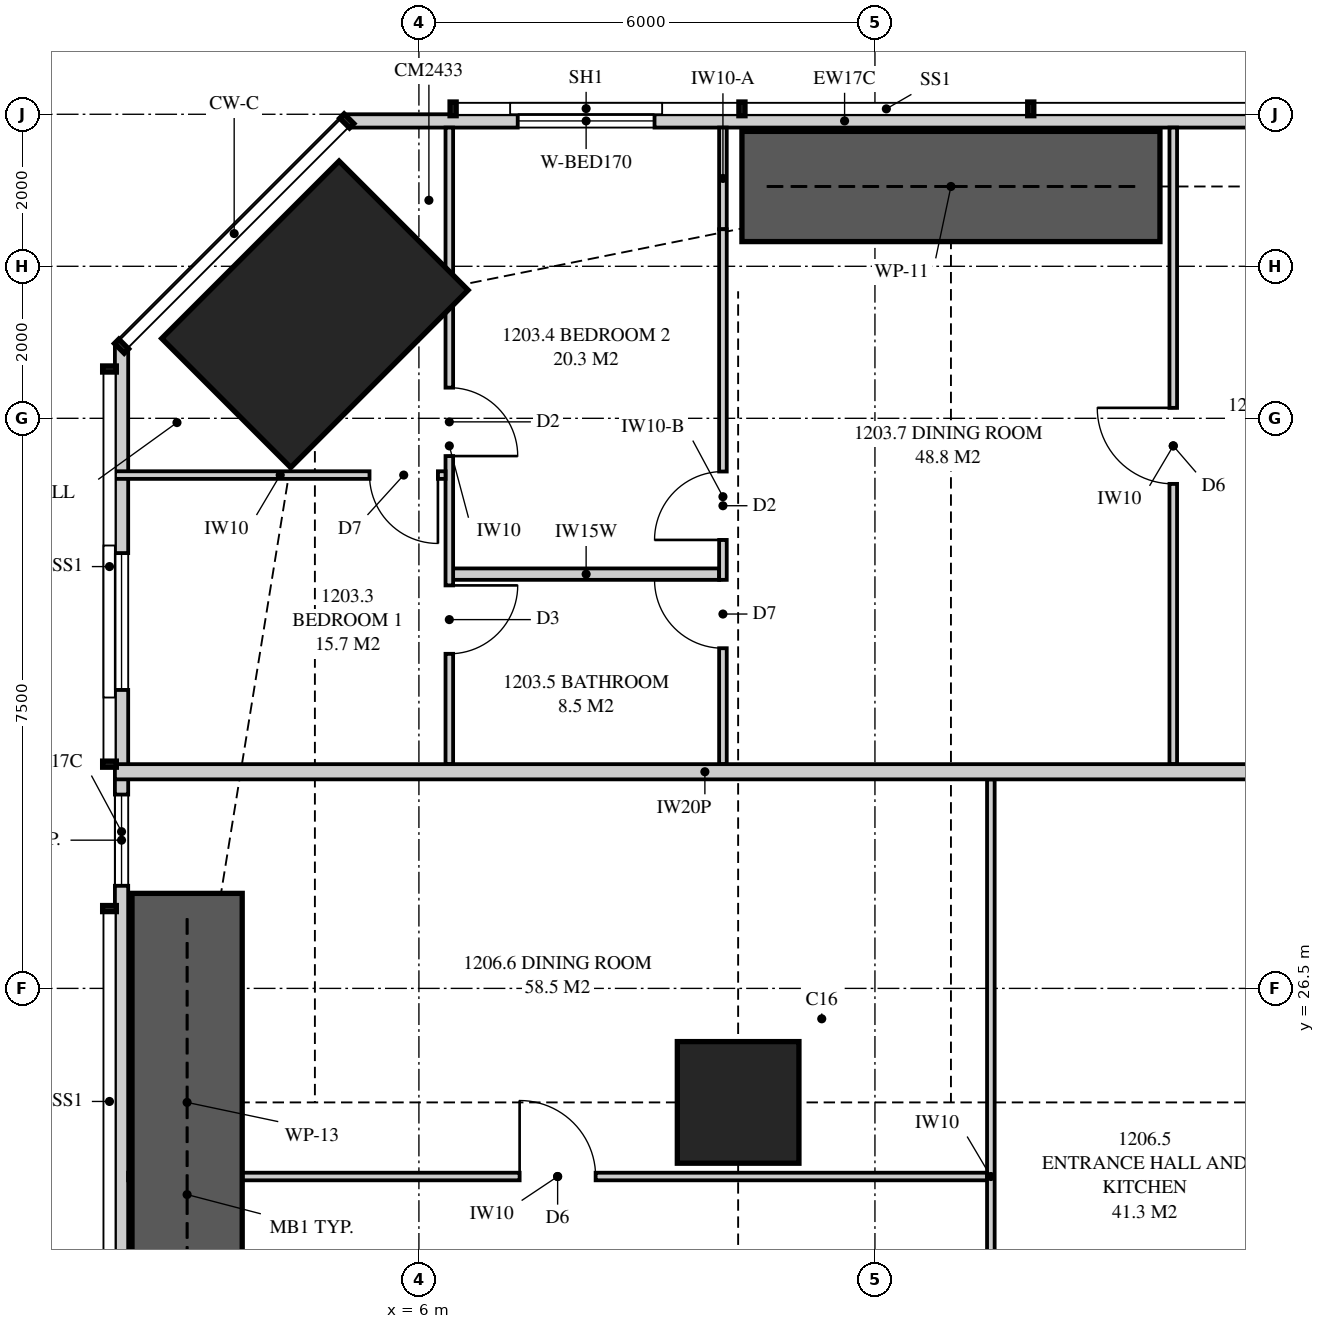
"""IFC4 building model, lengths in metres.
Left out: names, types, materials, properties, quantities, classifications, styles, units other than length and angle.
Written with IfcOpenShell. Run it as: python <this file> out.ifc"""

import sys

from ifc_helpers import new_model, si_unit, direction, frame, frame_2d, origin, origin_2d, place, context, subcontext, project, spatial, polyline, rectangle, outline, extrude, element, fill, save


model = new_model("IFC4")
c1 = context("Model", 3, precision=1e-05, world=origin(), true_north=direction((0.0, 1.0)))
c2 = subcontext(c1, "Body", "Model", "MODEL_VIEW")
j1 = project(units=[si_unit("LENGTHUNIT", "METRE"), si_unit("PLANEANGLEUNIT", "RADIAN")], contexts=[c1])
p1 = place(None, origin())
s1 = spatial("IfcSite", under=j1, at=p1, CompositionType="ELEMENT")
p2 = place(p1, origin())
s2 = spatial("IfcBuilding", under=s1, at=p2, CompositionType="ELEMENT")
p3 = place(p2, frame((0.0, 0.0, 47.8)))
s3 = spatial("IfcBuildingStorey", under=s2, at=p3, CompositionType="ELEMENT", Elevation=47.8)
p4 = place(p3, frame((4.631, 35.369, 0.0), z_axis=(0.0, 0.0, 1.0), x_axis=(0.707106781187, -0.707106781187, 0.0)))
e1 = element("IfcColumn", 1, at=p4, inside=s3, PredefinedType="COLUMN", context=c2, shape_type="SweptSolid", body=[
    extrude(rectangle(XDim=2.4, YDim=3.3, at=origin_2d()), origin(), (0.0, 0.0, 1.0), 3.35),
])
p5 = place(p3, frame((10.2, 25.0, 0.0), z_axis=(0.0, 0.0, 1.0), x_axis=(1.0, 0.0, 0.0)))
e2 = element("IfcColumn", 2, at=p5, inside=s3, PredefinedType="COLUMN", context=c2, shape_type="SweptSolid", body=[
    extrude(rectangle(XDim=1.6, YDim=1.6, at=origin_2d()), origin(), (0.0, 0.0, 1.0), 3.35),
])
p6 = place(p3, frame((18.15, 37.913, 0.0), z_axis=(0.0, 0.0, 1.0), x_axis=(-1.0, 0.0, 0.0)))
e3 = element("IfcWall", 3, at=p6, inside=s3, PredefinedType="SOLIDWALL", context=c2, shape_type="SweptSolid", body=[
    extrude(outline(polyline([(0.0, 0.0), (13.099, 0.0), (13.099, 3.11), (5.354, 3.11), (5.354, 2.15), (5.306, 2.15), (5.306, 3.11), (5.15, 3.11), (5.15, 2.15), (0.0, 2.15), (0.0, 0.0)])), frame((0.0, 0.087, 0.0), z_axis=(0.0, -1.0, 0.0), x_axis=(1.0, 0.0, 0.0)), (0.0, 0.0, 1.0), 0.175),
])
p7 = place(p6, frame((9.05, 0.0, 0.4)))
e4 = element("IfcOpeningElement", 4, at=p7, cuts=e3, PredefinedType="OPENING", context=c2, shape_type="SweptSolid", body=[
    extrude(rectangle(XDim=1.8, YDim=1.7, at=frame_2d((0.9, 0.85))), frame((0.0, 0.097, 0.0), z_axis=(0.0, -1.0, 0.0), x_axis=(1.0, 0.0, 0.0)), (0.0, 0.0, 1.0), 0.195),
])
p8 = place(p3, frame((2.087, 34.949, 0.0), z_axis=(0.0, 0.0, 1.0), x_axis=(0.0, -1.0, 0.0)))
e5 = element("IfcWall", 5, at=p8, inside=s3, PredefinedType="SOLIDWALL", context=c2, shape_type="SweptSolid", body=[
    extrude(outline(polyline([(0.0, 0.0), (12.774, 0.0), (12.774, 2.15), (9.949, 2.15), (9.949, 3.11), (9.823, 3.11), (9.823, 2.15), (9.73, 2.15), (9.73, 3.11), (0.0, 3.11), (0.0, 0.0)])), frame((0.0, 0.087, 0.0), z_axis=(0.0, -1.0, 0.0), x_axis=(1.0, 0.0, 0.0)), (0.0, 0.0, 1.0), 0.175),
])
p9 = place(p8, frame((2.722, 0.0, 0.4)))
e6 = element("IfcOpeningElement", 6, at=p9, cuts=e5, PredefinedType="OPENING", context=c2, shape_type="SweptSolid", body=[
    extrude(rectangle(XDim=1.8, YDim=1.7, at=frame_2d((0.9, 0.85))), frame((0.0, 0.097, 0.0), z_axis=(0.0, -1.0, 0.0), x_axis=(1.0, 0.0, 0.0)), (0.0, 0.0, 1.0), 0.195),
])
p10 = place(p8, frame((5.899, 0.0, 0.4)))
e7 = element("IfcOpeningElement", 7, at=p10, cuts=e5, PredefinedType="OPENING", context=c2, shape_type="SweptSolid", body=[
    extrude(rectangle(XDim=1.2, YDim=1.7, at=frame_2d((0.6, 0.85))), frame((0.0, 0.097, 0.0), z_axis=(0.0, -1.0, 0.0), x_axis=(1.0, 0.0, 0.0)), (0.0, 0.0, 1.0), 0.195),
])
p11 = place(p3, frame((6.4, 37.825, 0.0), z_axis=(0.0, 0.0, 1.0), x_axis=(0.0, -1.0, 0.0)))
e8 = element("IfcWall", 8, at=p11, inside=s3, PredefinedType="PARTITIONING", context=c2, shape_type="SweptSolid", body=[
    extrude(outline(polyline([(0.0, 0.0), (8.375, 0.0), (8.375, 3.11), (2.978, 3.11), (2.978, 2.15), (1.224, 2.15), (1.224, 3.11), (0.0, 3.11), (0.0, 0.0)])), frame((0.0, 0.05, 0.0), z_axis=(0.0, -1.0, 0.0), x_axis=(1.0, 0.0, 0.0)), (0.0, 0.0, 1.0), 0.1),
])
p12 = place(p11, frame((3.422, 0.0, 0.0)))
e9 = element("IfcOpeningElement", 9, at=p12, cuts=e8, PredefinedType="OPENING", context=c2, shape_type="SweptSolid", body=[
    extrude(rectangle(XDim=0.9, YDim=2.1, at=frame_2d((0.45, 1.05))), frame((0.0, 0.06, 0.0), z_axis=(0.0, -1.0, 0.0), x_axis=(1.0, 0.0, 0.0)), (0.0, 0.0, 1.0), 0.12),
])
p13 = place(p11, frame((6.023, 0.0, 0.0)))
e10 = element("IfcOpeningElement", 10, at=p13, cuts=e8, PredefinedType="OPENING", context=c2, shape_type="SweptSolid", body=[
    extrude(rectangle(XDim=0.9, YDim=2.1, at=frame_2d((0.45, 1.05))), frame((0.0, 0.06, 0.0), z_axis=(0.0, -1.0, 0.0), x_axis=(1.0, 0.0, 0.0)), (0.0, 0.0, 1.0), 0.12),
])
p14 = place(p3, frame((10.0, 37.825, 0.0), z_axis=(0.0, 0.0, 1.0), x_axis=(0.0, -1.0, 0.0)))
e11 = element("IfcWall", 11, at=p14, inside=s3, PredefinedType="PARTITIONING", context=c2, shape_type="SweptSolid", body=[
    extrude(outline(polyline([(0.0, 0.0), (1.338, 0.0), (1.338, 2.15), (0.5, 2.15), (0.5, 3.11), (0.0, 3.11), (0.0, 0.0)])), frame((0.0, 0.05, 0.0), z_axis=(0.0, -1.0, 0.0), x_axis=(1.0, 0.0, 0.0)), (0.0, 0.0, 1.0), 0.1),
])
p15 = place(p3, frame((10.0, 36.487, 0.0), z_axis=(0.0, 0.0, 1.0), x_axis=(0.0, -1.0, 0.0)))
e12 = element("IfcWall", 12, at=p15, inside=s3, PredefinedType="PARTITIONING", context=c2, shape_type="SweptSolid", body=[
    extrude(outline(polyline([(0.0, 0.0), (7.037, 0.0), (7.037, 2.51), (0.917, 2.51), (0.917, 2.15), (0.0, 2.15), (0.0, 0.0)])), frame((0.0, 0.05, 0.0), z_axis=(0.0, -1.0, 0.0), x_axis=(1.0, 0.0, 0.0)), (0.0, 0.0, 1.0), 0.1),
])
p16 = place(p15, frame((3.188, 0.0, 0.0)))
e13 = element("IfcOpeningElement", 13, at=p16, cuts=e12, PredefinedType="OPENING", context=c2, shape_type="SweptSolid", body=[
    extrude(rectangle(XDim=0.9, YDim=2.1, at=frame_2d((0.45, 1.05))), frame((0.0, 0.06, 0.0), z_axis=(0.0, -1.0, 0.0), x_axis=(1.0, 0.0, 0.0)), (0.0, 0.0, 1.0), 0.12),
])
p17 = place(p15, frame((4.612, 0.0, 0.0)))
e14 = element("IfcOpeningElement", 14, at=p17, cuts=e12, PredefinedType="OPENING", context=c2, shape_type="SweptSolid", body=[
    extrude(rectangle(XDim=0.9, YDim=2.1, at=frame_2d((0.45, 1.05))), frame((0.0, 0.06, 0.0), z_axis=(0.0, -1.0, 0.0), x_axis=(1.0, 0.0, 0.0)), (0.0, 0.0, 1.0), 0.12),
])
p18 = place(p3, frame((2.0, 33.253, 0.0), z_axis=(0.0, 0.0, 1.0), x_axis=(1.0, 0.0, 0.0)))
e15 = element("IfcWall", 15, at=p18, inside=s3, PredefinedType="PARTITIONING", context=c2, shape_type="SweptSolid", body=[
    extrude(outline(polyline([(0.0, 0.0), (4.35, 0.0), (4.35, 3.11), (3.16, 3.11), (3.16, 2.15), (1.417, 2.15), (1.417, 3.11), (0.0, 3.11), (0.0, 0.0)])), frame((0.0, 0.05, 0.0), z_axis=(0.0, -1.0, 0.0), x_axis=(1.0, 0.0, 0.0)), (0.0, 0.0, 1.0), 0.1),
])
p19 = place(p18, frame((3.35, 0.0, 0.0)))
e16 = element("IfcOpeningElement", 16, at=p19, cuts=e15, PredefinedType="OPENING", context=c2, shape_type="SweptSolid", body=[
    extrude(rectangle(XDim=0.9, YDim=2.1, at=frame_2d((0.45, 1.05))), frame((0.0, 0.06, 0.0), z_axis=(0.0, -1.0, 0.0), x_axis=(1.0, 0.0, 0.0)), (0.0, 0.0, 1.0), 0.12),
])
p20 = place(p3, frame((6.45, 31.95, 0.0), z_axis=(0.0, 0.0, 1.0), x_axis=(1.0, 0.0, 0.0)))
e17 = element("IfcWall", 17, at=p20, inside=s3, PredefinedType="PLUMBINGWALL", context=c2, shape_type="SweptSolid", body=[
    extrude(outline(polyline([(0.0, 0.0), (3.5, 0.0), (3.5, 3.11), (3.5, 2.51), (2.465, 2.51), (2.465, 3.11), (0.0, 3.11), (0.0, 0.0)])), frame((0.0, 0.075, 0.0), z_axis=(0.0, -1.0, 0.0), x_axis=(1.0, 0.0, 0.0)), (0.0, 0.0, 1.0), 0.15),
])
p21 = place(p3, frame((15.925, 37.825, 0.0), z_axis=(0.0, 0.0, 1.0), x_axis=(0.0, -1.0, 0.0)))
e18 = element("IfcWall", 18, at=p21, inside=s3, PredefinedType="PARTITIONING", context=c2, shape_type="SweptSolid", body=[
    extrude(outline(polyline([(0.0, 0.0), (8.375, 0.0), (8.375, 3.11), (1.635, 3.11), (1.635, 2.15), (0.0, 2.15), (0.0, 3.11), (0.0, 0.0)])), frame((0.0, 0.05, 0.0), z_axis=(0.0, -1.0, 0.0), x_axis=(1.0, 0.0, 0.0)), (0.0, 0.0, 1.0), 0.1),
])
p22 = place(p21, frame((3.688, 0.0, 0.0)))
e19 = element("IfcOpeningElement", 19, at=p22, cuts=e18, PredefinedType="OPENING", context=c2, shape_type="SweptSolid", body=[
    extrude(rectangle(XDim=1.0, YDim=2.1, at=frame_2d((0.5, 1.05))), frame((0.0, 0.06, 0.0), z_axis=(0.0, -1.0, 0.0), x_axis=(1.0, 0.0, 0.0)), (0.0, 0.0, 1.0), 0.12),
])
p23 = place(p3, frame((2.0, 29.35, 0.0), z_axis=(0.0, 0.0, 1.0), x_axis=(1.0, 0.0, 0.0)))
e20 = element("IfcWall", 20, at=p23, inside=s3, PredefinedType="PARTITIONING", context=c2, shape_type="SweptSolid", body=[
    extrude(outline(polyline([(0.0, 0.0), (15.525, 0.0), (15.525, 3.11), (11.337, 3.11), (11.337, 2.541), (10.663, 2.541), (10.663, 3.11), (9.51, 3.11), (9.51, 2.51), (6.89, 2.51), (6.89, 3.11), (2.969, 3.11), (2.969, 2.541), (2.577, 2.541), (2.577, 2.15), (0.733, 2.15), (0.733, 3.11), (0.0, 3.11), (0.0, 0.0)])), frame((0.0, 0.1, 0.0), z_axis=(0.0, -1.0, 0.0), x_axis=(1.0, 0.0, 0.0)), (0.0, 0.0, 1.0), 0.2),
])
p24 = place(p3, frame((13.525, 18.8, 0.0), z_axis=(0.0, 0.0, 1.0), x_axis=(0.0, 1.0, 0.0)))
e21 = element("IfcWall", 21, at=p24, inside=s3, PredefinedType="PARTITIONING", context=c2, shape_type="SweptSolid", body=[
    extrude(outline(polyline([(0.0, 0.0), (10.45, 0.0), (10.45, 3.11), (6.487, 3.11), (6.487, 2.541), (5.913, 2.541), (5.913, 3.11), (0.0, 3.11), (0.0, 0.0)])), frame((0.0, 0.05, 0.0), z_axis=(0.0, -1.0, 0.0), x_axis=(1.0, 0.0, 0.0)), (0.0, 0.0, 1.0), 0.1),
])
p25 = place(p24, frame((2.95, 0.0, 0.0)))
e22 = element("IfcOpeningElement", 22, at=p25, cuts=e21, PredefinedType="OPENING", context=c2, shape_type="SweptSolid", body=[
    extrude(rectangle(XDim=1.0, YDim=2.1, at=frame_2d((0.5, 1.05))), frame((0.0, 0.06, 0.0), z_axis=(0.0, -1.0, 0.0), x_axis=(1.0, 0.0, 0.0)), (0.0, 0.0, 1.0), 0.12),
])
p26 = place(p3, frame((2.175, 24.025, 0.0), z_axis=(0.0, 0.0, 1.0), x_axis=(1.0, 0.0, 0.0)))
e23 = element("IfcWall", 23, at=p26, inside=s3, PredefinedType="PARTITIONING", context=c2, shape_type="SweptSolid", body=[
    extrude(outline(polyline([(0.529, 2.15), (0.0, 2.15), (0.0, 0.0), (0.529, 0.0), (0.529, 0.798), (1.021, 0.798), (1.021, 0.0), (11.3, 0.0), (11.3, 3.11), (9.285, 3.11), (9.285, 2.51), (6.765, 2.51), (6.765, 3.11), (1.635, 3.11), (1.635, 2.15), (1.021, 2.15), (1.021, 1.352), (0.529, 1.352), (0.529, 2.15)])), frame((0.0, 0.05, 0.0), z_axis=(0.0, -1.0, 0.0), x_axis=(1.0, 0.0, 0.0)), (0.0, 0.0, 1.0), 0.1),
])
p27 = place(p26, frame((5.15, 0.0, 0.0)))
e24 = element("IfcOpeningElement", 24, at=p27, cuts=e23, PredefinedType="OPENING", context=c2, shape_type="SweptSolid", body=[
    extrude(rectangle(XDim=1.0, YDim=2.1, at=frame_2d((0.5, 1.05))), frame((0.0, 0.06, 0.0), z_axis=(0.0, -1.0, 0.0), x_axis=(1.0, 0.0, 0.0)), (0.0, 0.0, 1.0), 0.12),
])
for number, where, z_axis, x_axis in (
    (25, (10.25, 37.05, 0.0), (0.0, 0.0, 1.0), (1.0, 0.0, 0.0)),
    (26, (2.95, 22.25, 0.0), (0.0, 0.0, 1.0), (0.0, 1.0, 0.0)),
):
    element("IfcWall", number, at=place(p3, frame(where, z_axis=z_axis, x_axis=x_axis)), inside=s3, PredefinedType="SHEAR", context=c2, shape_type="SweptSolid", body=[
        extrude(rectangle(XDim=5.5, YDim=1.45, at=frame_2d((2.75, 0.0))), origin(), (0.0, 0.0, 1.0), 3.35),
    ])
p28 = place(p7, origin())
e27 = element("IfcWindow", 27, at=p28, inside=s3, PartitioningType="SINGLE_PANEL", PredefinedType="WINDOW", context=c2, shape_type="SweptSolid", body=[
    extrude(rectangle(XDim=1.8, YDim=1.7, at=frame_2d((0.9, 0.85))), frame((0.0, 0.03, 0.0), z_axis=(0.0, -1.0, 0.0), x_axis=(1.0, 0.0, 0.0)), (0.0, 0.0, 1.0), 0.06),
])
fill(e4, e27)
p29 = place(p9, origin())
e28 = element("IfcWindow", 28, at=p29, inside=s3, PartitioningType="SINGLE_PANEL", PredefinedType="WINDOW", context=c2, shape_type="SweptSolid", body=[
    extrude(rectangle(XDim=1.8, YDim=1.7, at=frame_2d((0.9, 0.85))), frame((0.0, 0.03, 0.0), z_axis=(0.0, -1.0, 0.0), x_axis=(1.0, 0.0, 0.0)), (0.0, 0.0, 1.0), 0.06),
])
fill(e6, e28)
p30 = place(p10, origin())
e29 = element("IfcWindow", 29, at=p30, inside=s3, PartitioningType="SINGLE_PANEL", PredefinedType="WINDOW", context=c2, shape_type="SweptSolid", body=[
    extrude(rectangle(XDim=1.2, YDim=1.7, at=frame_2d((0.6, 0.85))), frame((0.0, 0.03, 0.0), z_axis=(0.0, -1.0, 0.0), x_axis=(1.0, 0.0, 0.0)), (0.0, 0.0, 1.0), 0.06),
])
fill(e7, e29)
p31 = place(p19, frame((0.9, 0.0, 0.0), z_axis=(0.0, 0.0, 1.0), x_axis=(-1.0, 0.0, 0.0)))
e30 = element("IfcDoor", 30, at=p31, inside=s3, OperationType="SINGLE_SWING_LEFT", PredefinedType="DOOR", context=c2, shape_type="SweptSolid", body=[
    extrude(rectangle(XDim=0.9, YDim=2.1, at=frame_2d((0.45, 1.05))), frame((0.0, 0.025, 0.0), z_axis=(0.0, -1.0, 0.0), x_axis=(1.0, 0.0, 0.0)), (0.0, 0.0, 1.0), 0.05),
])
fill(e16, e30)
p32 = place(p12, origin())
e31 = element("IfcDoor", 31, at=p32, inside=s3, OperationType="SINGLE_SWING_RIGHT", PredefinedType="DOOR", context=c2, shape_type="SweptSolid", body=[
    extrude(rectangle(XDim=0.9, YDim=2.1, at=frame_2d((0.45, 1.05))), frame((0.0, 0.025, 0.0), z_axis=(0.0, -1.0, 0.0), x_axis=(1.0, 0.0, 0.0)), (0.0, 0.0, 1.0), 0.05),
])
fill(e9, e31)
p33 = place(p16, frame((0.9, 0.0, 0.0), z_axis=(0.0, 0.0, 1.0), x_axis=(-1.0, 0.0, 0.0)))
e32 = element("IfcDoor", 32, at=p33, inside=s3, OperationType="SINGLE_SWING_LEFT", PredefinedType="DOOR", context=c2, shape_type="SweptSolid", body=[
    extrude(rectangle(XDim=0.9, YDim=2.1, at=frame_2d((0.45, 1.05))), frame((0.0, 0.025, 0.0), z_axis=(0.0, -1.0, 0.0), x_axis=(1.0, 0.0, 0.0)), (0.0, 0.0, 1.0), 0.05),
])
fill(e13, e32)
p34 = place(p17, frame((0.9, 0.0, 0.0), z_axis=(0.0, 0.0, 1.0), x_axis=(-1.0, 0.0, 0.0)))
e33 = element("IfcDoor", 33, at=p34, inside=s3, OperationType="SINGLE_SWING_RIGHT", PredefinedType="DOOR", context=c2, shape_type="SweptSolid", body=[
    extrude(rectangle(XDim=0.9, YDim=2.1, at=frame_2d((0.45, 1.05))), frame((0.0, 0.025, 0.0), z_axis=(0.0, -1.0, 0.0), x_axis=(1.0, 0.0, 0.0)), (0.0, 0.0, 1.0), 0.05),
])
fill(e14, e33)
p35 = place(p13, origin())
e34 = element("IfcDoor", 34, at=p35, inside=s3, OperationType="SINGLE_SWING_LEFT", PredefinedType="DOOR", context=c2, shape_type="SweptSolid", body=[
    extrude(rectangle(XDim=0.9, YDim=2.1, at=frame_2d((0.45, 1.05))), frame((0.0, 0.025, 0.0), z_axis=(0.0, -1.0, 0.0), x_axis=(1.0, 0.0, 0.0)), (0.0, 0.0, 1.0), 0.05),
])
fill(e10, e34)
p36 = place(p22, frame((1.0, 0.0, 0.0), z_axis=(0.0, 0.0, 1.0), x_axis=(-1.0, 0.0, 0.0)))
e35 = element("IfcDoor", 35, at=p36, inside=s3, OperationType="SINGLE_SWING_RIGHT", PredefinedType="DOOR", context=c2, shape_type="SweptSolid", body=[
    extrude(rectangle(XDim=1.0, YDim=2.1, at=frame_2d((0.5, 1.05))), frame((0.0, 0.025, 0.0), z_axis=(0.0, -1.0, 0.0), x_axis=(1.0, 0.0, 0.0)), (0.0, 0.0, 1.0), 0.05),
])
fill(e19, e35)
p37 = place(p27, origin())
e36 = element("IfcDoor", 36, at=p37, inside=s3, OperationType="SINGLE_SWING_LEFT", PredefinedType="DOOR", context=c2, shape_type="SweptSolid", body=[
    extrude(rectangle(XDim=1.0, YDim=2.1, at=frame_2d((0.5, 1.05))), frame((0.0, 0.025, 0.0), z_axis=(0.0, -1.0, 0.0), x_axis=(1.0, 0.0, 0.0)), (0.0, 0.0, 1.0), 0.05),
])
fill(e24, e36)
save(model, sys.argv[1])
